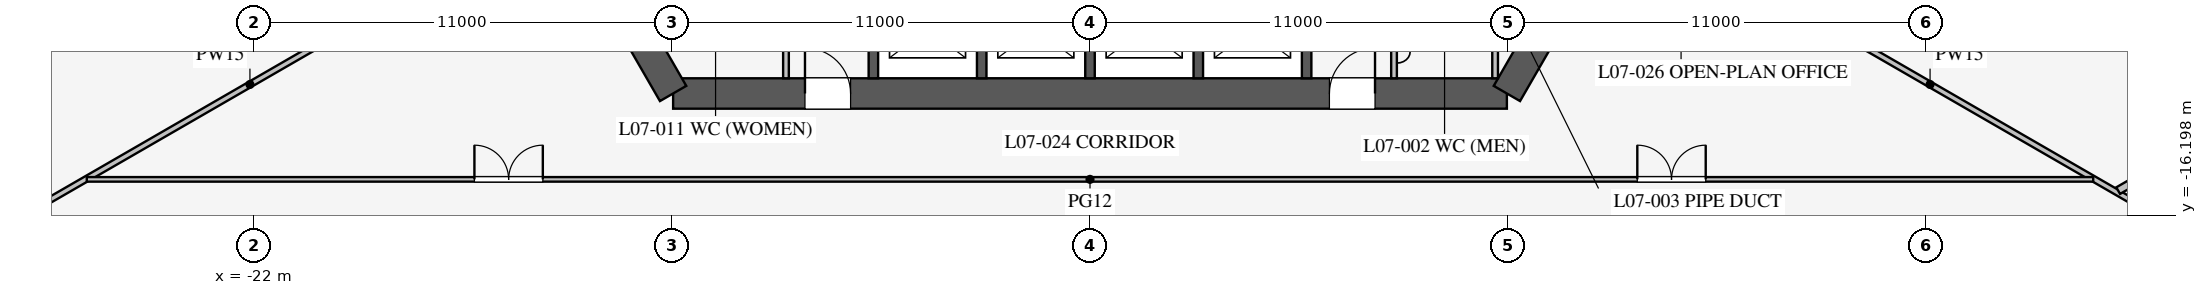
"""IFC4 building model, lengths in metres.
Left out: names, types, materials, properties, quantities, classifications, styles, units other than length and angle.
Written with IfcOpenShell. Run it as: python <this file> out.ifc"""

import sys

from ifc_helpers import new_model, si_unit, direction, frame, frame_2d, origin, place, context, subcontext, project, spatial, rectangle, extrude, element, fill, save


model = new_model("IFC4")
c1 = context("Model", 3, precision=1e-05, world=origin(), true_north=direction((0.0, 1.0)))
c2 = subcontext(c1, "Body", "Model", "MODEL_VIEW")
j1 = project(units=[si_unit("LENGTHUNIT", "METRE"), si_unit("PLANEANGLEUNIT", "RADIAN")], contexts=[c1])
p1 = place(None, origin())
s1 = spatial("IfcSite", under=j1, at=p1, CompositionType="ELEMENT")
p2 = place(p1, origin())
s2 = spatial("IfcBuilding", under=s1, at=p2, CompositionType="ELEMENT")
p3 = place(p2, frame((0.0, 0.0, 33.3)))
s3 = spatial("IfcBuildingStorey", under=s2, at=p3, CompositionType="ELEMENT", Elevation=33.3)
p4 = place(p3, frame((-10.97, -13.0, 0.0), z_axis=(0.0, 0.0, 1.0), x_axis=(1.0, 0.0, 0.0)))
e1 = element("IfcWall", 1, at=p4, inside=s3, PredefinedType="SHEAR", context=c2, shape_type="SweptSolid", body=[
    extrude(rectangle(XDim=21.939, YDim=0.8, at=frame_2d((10.97, 0.0))), origin(), (0.0, 0.0, 1.0), 4.2),
])
p5 = place(p4, frame((17.27, 0.0, 0.0)))
e2 = element("IfcOpeningElement", 2, at=p5, cuts=e1, PredefinedType="OPENING", context=c2, shape_type="SweptSolid", body=[
    extrude(rectangle(XDim=1.2, YDim=2.1, at=frame_2d((0.6, 1.05))), frame((0.0, 0.41, 0.0), z_axis=(0.0, -1.0, 0.0), x_axis=(1.0, 0.0, 0.0)), (0.0, 0.0, 1.0), 0.82),
])
p6 = place(p4, frame((3.47, 0.0, 0.0)))
e3 = element("IfcOpeningElement", 3, at=p6, cuts=e1, PredefinedType="OPENING", context=c2, shape_type="SweptSolid", body=[
    extrude(rectangle(XDim=1.2, YDim=2.1, at=frame_2d((0.6, 1.05))), frame((0.0, 0.41, 0.0), z_axis=(0.0, -1.0, 0.0), x_axis=(1.0, 0.0, 0.0)), (0.0, 0.0, 1.0), 0.82),
])
for number, where, z_axis, x_axis in (
    (4, (10.97, -13.0, 0.0), (0.0, 0.0, 1.0), (0.5, 0.866, 0.0)),
    (5, (-16.743, -3.0, 0.0), (0.0, 0.0, 1.0), (0.5, -0.866, 0.0)),
):
    element("IfcWall", number, at=place(p3, frame(where, z_axis=z_axis, x_axis=x_axis)), inside=s3, PredefinedType="SHEAR", context=c2, shape_type="SweptSolid", body=[
        extrude(rectangle(XDim=11.547, YDim=0.8, at=frame_2d((5.773, 0.0))), origin(), (0.0, 0.0, 1.0), 4.2),
    ])
for number, where, z_axis, x_axis in (
    (6, (-5.7, -10.025, 0.0), (0.0, 0.0, 1.0), (0.0, -1.0, 0.0)),
    (7, (-2.85, -10.025, 0.0), (0.0, 0.0, 1.0), (0.0, -1.0, 0.0)),
    (8, (0.0, -10.025, 0.0), (0.0, 0.0, 1.0), (0.0, -1.0, 0.0)),
    (9, (2.85, -10.025, 0.0), (0.0, 0.0, 1.0), (0.0, -1.0, 0.0)),
    (10, (5.7, -10.025, 0.0), (0.0, 0.0, 1.0), (0.0, -1.0, 0.0)),
):
    element("IfcWall", number, at=place(p3, frame(where, z_axis=z_axis, x_axis=x_axis)), inside=s3, PredefinedType="SHEAR", context=c2, shape_type="SweptSolid", body=[
        extrude(rectangle(XDim=2.575, YDim=0.25, at=frame_2d((1.288, 0.0))), origin(), (0.0, 0.0, 1.0), 4.2),
    ])
p7 = place(p3, frame((8.0, -7.5, 0.0), z_axis=(0.0, 0.0, 1.0), x_axis=(0.0, -1.0, 0.0)))
e11 = element("IfcWall", 11, at=p7, inside=s3, PredefinedType="PARTITIONING", context=c2, shape_type="SweptSolid", body=[
    extrude(rectangle(XDim=5.1, YDim=0.15, at=frame_2d((2.55, 0.0))), origin(), (0.0, 0.0, 1.0), 4.0),
])
p8 = place(p7, frame((1.3, 0.0, 0.0)))
e12 = element("IfcOpeningElement", 12, at=p8, cuts=e11, PredefinedType="OPENING", context=c2, shape_type="SweptSolid", body=[
    extrude(rectangle(XDim=0.9, YDim=2.1, at=frame_2d((0.45, 1.05))), frame((0.0, 0.085, 0.0), z_axis=(0.0, -1.0, 0.0), x_axis=(1.0, 0.0, 0.0)), (0.0, 0.0, 1.0), 0.17),
])
p9 = place(p3, frame((-8.0, -7.5, 0.0), z_axis=(0.0, 0.0, 1.0), x_axis=(0.0, -1.0, 0.0)))
e13 = element("IfcWall", 13, at=p9, inside=s3, PredefinedType="PARTITIONING", context=c2, shape_type="SweptSolid", body=[
    extrude(rectangle(XDim=5.1, YDim=0.15, at=frame_2d((2.55, 0.0))), origin(), (0.0, 0.0, 1.0), 4.0),
])
p10 = place(p9, frame((2.6, 0.0, 0.0)))
e14 = element("IfcOpeningElement", 14, at=p10, cuts=e13, PredefinedType="OPENING", context=c2, shape_type="SweptSolid", body=[
    extrude(rectangle(XDim=0.9, YDim=2.1, at=frame_2d((0.45, 1.05))), frame((0.0, 0.085, 0.0), z_axis=(0.0, -1.0, 0.0), x_axis=(1.0, 0.0, 0.0)), (0.0, 0.0, 1.0), 0.17),
])
p11 = place(p3, frame((10.66, -8.5, 0.0), z_axis=(0.0, 0.0, 1.0), x_axis=(0.0, -1.0, 0.0)))
e15 = element("IfcWall", 15, at=p11, inside=s3, PredefinedType="PARTITIONING", context=c2, shape_type="SweptSolid", body=[
    extrude(rectangle(XDim=4.1, YDim=0.15, at=frame_2d((2.05, 0.0))), origin(), (0.0, 0.0, 1.0), 4.0),
])
for number, where, z_axis, x_axis in (
    (16, (14.203, -8.2, 0.0), (0.0, 0.0, 1.0), (0.866, -0.5, 0.0)),
    (17, (-14.203, -8.2, 0.0), (0.0, 0.0, 1.0), (-0.866, -0.5, 0.0)),
):
    element("IfcWall", number, at=place(p3, frame(where, z_axis=z_axis, x_axis=x_axis)), inside=s3, PredefinedType="PARTITIONING", context=c2, shape_type="SweptSolid", body=[
        extrude(rectangle(XDim=18.25, YDim=0.15, at=frame_2d((9.125, 0.0))), origin(), (0.0, 0.0, 1.0), 2.3),
    ])
p12 = place(p3, frame((-26.398, -15.26, 0.0), z_axis=(0.0, 0.0, 1.0), x_axis=(1.0, 0.0, 0.0)))
e18 = element("IfcWall", 18, at=p12, inside=s3, PredefinedType="PARTITIONING", context=c2, shape_type="SweptSolid", body=[
    extrude(rectangle(XDim=52.796, YDim=0.12, at=frame_2d((26.398, 0.0))), origin(), (0.0, 0.0, 1.0), 2.9),
])
p13 = place(p12, frame((10.2, 0.0, 0.15)))
e19 = element("IfcOpeningElement", 19, at=p13, cuts=e18, PredefinedType="OPENING", context=c2, shape_type="SweptSolid", body=[
    extrude(rectangle(XDim=1.8, YDim=2.1, at=frame_2d((0.9, 1.05))), frame((0.0, 0.07, 0.0), z_axis=(0.0, -1.0, 0.0), x_axis=(1.0, 0.0, 0.0)), (0.0, 0.0, 1.0), 0.14),
])
p14 = place(p12, frame((40.8, 0.0, 0.15)))
e20 = element("IfcOpeningElement", 20, at=p14, cuts=e18, PredefinedType="OPENING", context=c2, shape_type="SweptSolid", body=[
    extrude(rectangle(XDim=1.8, YDim=2.1, at=frame_2d((0.9, 1.05))), frame((0.0, 0.07, 0.0), z_axis=(0.0, -1.0, 0.0), x_axis=(1.0, 0.0, 0.0)), (0.0, 0.0, 1.0), 0.14),
])
p15 = place(p3, frame((27.055, -15.557, 0.0), z_axis=(0.0, 0.0, 1.0), x_axis=(0.866026445548, 0.499998195608, 0.0)))
e21 = element("IfcWall", 21, at=p15, inside=s3, PredefinedType="PARTITIONING", context=c2, shape_type="SweptSolid", body=[
    extrude(rectangle(XDim=8.124, YDim=0.2, at=frame_2d((4.062, 0.0))), origin(), (0.0, 0.0, 1.0), 2.9),
])
p16 = place(p15, frame((0.95, 0.0, 0.15)))
e22 = element("IfcOpeningElement", 22, at=p16, cuts=e21, PredefinedType="OPENING", context=c2, shape_type="SweptSolid", body=[
    extrude(rectangle(XDim=1.8, YDim=2.1, at=frame_2d((0.9, 1.05))), frame((0.0, 0.11, 0.0), z_axis=(0.0, -1.0, 0.0), x_axis=(1.0, 0.0, 0.0)), (0.0, 0.0, 1.0), 0.22),
])
p17 = place(p5, origin())
e23 = element("IfcDoor", 23, at=p17, inside=s3, OperationType="SINGLE_SWING_RIGHT", PredefinedType="DOOR", context=c2, shape_type="SweptSolid", body=[
    extrude(rectangle(XDim=1.2, YDim=2.1, at=frame_2d((0.6, 1.05))), frame((0.0, 0.025, 0.0), z_axis=(0.0, -1.0, 0.0), x_axis=(1.0, 0.0, 0.0)), (0.0, 0.0, 1.0), 0.05),
])
fill(e2, e23)
p18 = place(p6, origin())
e24 = element("IfcDoor", 24, at=p18, inside=s3, OperationType="SINGLE_SWING_LEFT", PredefinedType="DOOR", context=c2, shape_type="SweptSolid", body=[
    extrude(rectangle(XDim=1.2, YDim=2.1, at=frame_2d((0.6, 1.05))), frame((0.0, 0.025, 0.0), z_axis=(0.0, -1.0, 0.0), x_axis=(1.0, 0.0, 0.0)), (0.0, 0.0, 1.0), 0.05),
])
fill(e3, e24)
p19 = place(p13, origin())
e25 = element("IfcDoor", 25, at=p19, inside=s3, OperationType="DOUBLE_DOOR_SINGLE_SWING", PredefinedType="DOOR", context=c2, shape_type="SweptSolid", body=[
    extrude(rectangle(XDim=1.8, YDim=2.1, at=frame_2d((0.9, 1.05))), frame((0.0, 0.025, 0.0), z_axis=(0.0, -1.0, 0.0), x_axis=(1.0, 0.0, 0.0)), (0.0, 0.0, 1.0), 0.05),
])
fill(e19, e25)
p20 = place(p14, origin())
e26 = element("IfcDoor", 26, at=p20, inside=s3, OperationType="DOUBLE_DOOR_SINGLE_SWING", PredefinedType="DOOR", context=c2, shape_type="SweptSolid", body=[
    extrude(rectangle(XDim=1.8, YDim=2.1, at=frame_2d((0.9, 1.05))), frame((0.0, 0.025, 0.0), z_axis=(0.0, -1.0, 0.0), x_axis=(1.0, 0.0, 0.0)), (0.0, 0.0, 1.0), 0.05),
])
fill(e20, e26)
save(model, sys.argv[1])
